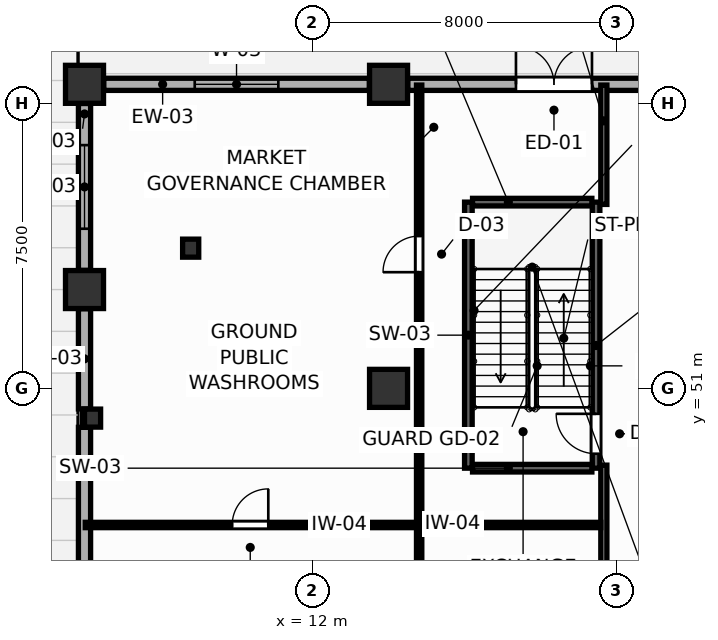
"""IFC4 building model, lengths in metres.
Left out: names, types, materials, properties, quantities, classifications, styles, units other than length and angle.
Written with IfcOpenShell. Run it as: python <this file> out.ifc"""

import sys

from ifc_helpers import new_model, si_unit, direction, frame, frame_2d, origin, origin_2d, place, context, subcontext, project, spatial, rectangle, i_section, extrude, source, transform, mapped, element, fill, save


model = new_model("IFC4")
c1 = context("Model", 3, precision=1e-05, world=origin(), true_north=direction((0.0, 1.0)))
c2 = subcontext(c1, "Body", "Model", "MODEL_VIEW")
j1 = project(units=[si_unit("LENGTHUNIT", "METRE"), si_unit("PLANEANGLEUNIT", "RADIAN")], contexts=[c1])
p1 = place(None, origin())
s1 = spatial("IfcSite", under=j1, at=p1, CompositionType="ELEMENT")
p2 = place(p1, origin())
s2 = spatial("IfcBuilding", under=s1, at=p2, CompositionType="ELEMENT")
p3 = place(p2, origin())
s3 = spatial("IfcBuildingStorey", under=s2, at=p3, CompositionType="ELEMENT", Elevation=0.0)
m1 = source(origin(), c2, "Body", "SweptSolid", [
    extrude(rectangle(XDim=1.0, YDim=1.0, at=origin_2d()), origin(), (0.0, 0.0, 1.0), 4.8),
])
for number, where, z_axis, x_axis in (
    (1, (6.0, 53.6, 0.0), (0.0, 0.0, 1.0), (1.0, 0.0, 0.0)),
    (2, (6.0, 59.0, 0.0), (0.0, 0.0, 1.0), (1.0, 0.0, 0.0)),
    (3, (14.0, 59.0, 0.0), (0.0, 0.0, 1.0), (1.0, 0.0, 0.0)),
    (4, (14.0, 51.0, 0.0), (0.0, 0.0, 1.0), (1.0, 0.0, 0.0)),
):
    element("IfcColumn", number, at=place(p3, frame(where, z_axis=z_axis, x_axis=x_axis)), inside=s3, PredefinedType="COLUMN", context=c2, shape_type="MappedRepresentation", body=[
        mapped(m1, transform((0.0, 0.0, 0.0), scale=1.0)),
    ])
m2 = source(origin(), c2, "Body", "SweptSolid", [
    extrude(i_section(OverallWidth=0.424, OverallDepth=0.474, WebThickness=0.045, FlangeThickness=0.072, FilletRadius=0.015, at=origin_2d()), origin(), (0.0, 0.0, 1.0), 4.8),
])
for number, where, z_axis, x_axis in (
    (5, (8.793, 54.689, 0.0), (0.0, 0.0, 1.0), (1.0, 0.0, 0.0)),
    (6, (6.211, 50.217, 0.0), (0.0, 0.0, 1.0), (1.0, 0.0, 0.0)),
):
    element("IfcColumn", number, at=place(p3, frame(where, z_axis=z_axis, x_axis=x_axis)), inside=s3, PredefinedType="COLUMN", context=c2, shape_type="MappedRepresentation", body=[
        mapped(m2, transform((0.0, 0.0, 0.0), scale=1.0)),
    ])
p4 = place(p3, frame((6.505, 59.0, 0.0), z_axis=(0.0, 0.0, 1.0), x_axis=(1.0, 0.0, 0.0)))
e7 = element("IfcWall", 7, at=p4, inside=s3, PredefinedType="SOLIDWALL", context=c2, shape_type="SweptSolid", body=[
    extrude(rectangle(XDim=6.99, YDim=0.32, at=frame_2d((3.495, 0.0))), origin(), (0.0, 0.0, 1.0), 3.82),
])
p5 = place(p4, frame((2.395, 0.0, 0.75)))
e8 = element("IfcOpeningElement", 8, at=p5, cuts=e7, PredefinedType="OPENING", context=c2, shape_type="SweptSolid", body=[
    extrude(rectangle(XDim=2.2, YDim=2.0, at=frame_2d((1.1, 1.0))), frame((0.0, 0.17, 0.0), z_axis=(0.0, -1.0, 0.0), x_axis=(1.0, 0.0, 0.0)), (0.0, 0.0, 1.0), 0.34),
])
p6 = place(p3, frame((14.505, 59.0, 0.0), z_axis=(0.0, 0.0, 1.0), x_axis=(1.0, 0.0, 0.0)))
e9 = element("IfcWall", 9, at=p6, inside=s3, PredefinedType="SOLIDWALL", context=c2, shape_type="SweptSolid", body=[
    extrude(rectangle(XDim=12.59, YDim=0.32, at=frame_2d((6.295, 0.0))), origin(), (0.0, 0.0, 1.0), 3.82),
])
p7 = place(p6, frame((2.847, 0.0, 0.0)))
e10 = element("IfcOpeningElement", 10, at=p7, cuts=e9, PredefinedType="OPENING", context=c2, shape_type="SweptSolid", body=[
    extrude(rectangle(XDim=2.0, YDim=2.25, at=frame_2d((1.0, 1.125))), frame((0.0, 0.17, 0.0), z_axis=(0.0, -1.0, 0.0), x_axis=(1.0, 0.0, 0.0)), (0.0, 0.0, 1.0), 0.34),
])
p8 = place(p3, frame((6.0, 40.505, 0.0), z_axis=(0.0, 0.0, 1.0), x_axis=(0.0, 1.0, 0.0)))
e11 = element("IfcWall", 11, at=p8, inside=s3, PredefinedType="SOLIDWALL", context=c2, shape_type="SweptSolid", body=[
    extrude(rectangle(XDim=9.47, YDim=0.32, at=frame_2d((4.735, 0.0))), origin(), (0.0, 0.0, 1.0), 3.82),
])
p9 = place(p8, frame((3.635, 0.0, 0.75)))
e12 = element("IfcOpeningElement", 12, at=p9, cuts=e11, PredefinedType="OPENING", context=c2, shape_type="SweptSolid", body=[
    extrude(rectangle(XDim=2.2, YDim=2.0, at=frame_2d((1.1, 1.0))), frame((0.0, 0.17, 0.0), z_axis=(0.0, -1.0, 0.0), x_axis=(1.0, 0.0, 0.0)), (0.0, 0.0, 1.0), 0.34),
])
p10 = place(p3, frame((6.0, 50.459, 0.0), z_axis=(0.0, 0.0, 1.0), x_axis=(0.0, 1.0, 0.0)))
e13 = element("IfcWall", 13, at=p10, inside=s3, PredefinedType="SOLIDWALL", context=c2, shape_type="SweptSolid", body=[
    extrude(rectangle(XDim=2.636, YDim=0.32, at=frame_2d((1.318, 0.0))), origin(), (0.0, 0.0, 1.0), 3.82),
])
p11 = place(p3, frame((6.0, 54.105, 0.0), z_axis=(0.0, 0.0, 1.0), x_axis=(0.0, 1.0, 0.0)))
e14 = element("IfcWall", 14, at=p11, inside=s3, PredefinedType="SOLIDWALL", context=c2, shape_type="SweptSolid", body=[
    extrude(rectangle(XDim=4.39, YDim=0.32, at=frame_2d((2.195, 0.0))), origin(), (0.0, 0.0, 1.0), 3.82),
])
p12 = place(p11, frame((1.095, 0.0, 0.75)))
e15 = element("IfcOpeningElement", 15, at=p12, cuts=e14, PredefinedType="OPENING", context=c2, shape_type="SweptSolid", body=[
    extrude(rectangle(XDim=2.2, YDim=2.0, at=frame_2d((1.1, 1.0))), frame((0.0, 0.17, 0.0), z_axis=(0.0, -1.0, 0.0), x_axis=(1.0, 0.0, 0.0)), (0.0, 0.0, 1.0), 0.34),
])
p13 = place(p3, frame((19.46, 48.9, 0.0), z_axis=(0.0, 0.0, 1.0), x_axis=(0.0, 1.0, 0.0)))
e16 = element("IfcWall", 16, at=p13, inside=s3, PredefinedType="SHEAR", context=c2, shape_type="SweptSolid", body=[
    extrude(rectangle(XDim=7.0, YDim=0.2, at=frame_2d((3.5, 0.0))), origin(), (0.0, 0.0, 1.0), 4.8),
])
p14 = place(p13, frame((0.38, 0.0, 0.0)))
e17 = element("IfcOpeningElement", 17, at=p14, cuts=e16, PredefinedType="OPENING", context=c2, shape_type="SweptSolid", body=[
    extrude(rectangle(XDim=1.05, YDim=2.1, at=frame_2d((0.525, 1.05))), frame((0.0, 0.11, 0.0), z_axis=(0.0, -1.0, 0.0), x_axis=(1.0, 0.0, 0.0)), (0.0, 0.0, 1.0), 0.22),
])
p15 = place(p3, frame((16.1, 48.9, 0.0), z_axis=(0.0, 0.0, 1.0), x_axis=(0.0, 1.0, 0.0)))
e18 = element("IfcWall", 18, at=p15, inside=s3, PredefinedType="SHEAR", context=c2, shape_type="SweptSolid", body=[
    extrude(rectangle(XDim=7.0, YDim=0.2, at=frame_2d((3.5, 0.0))), origin(), (0.0, 0.0, 1.0), 4.8),
])
for number, where, z_axis, x_axis in (
    (19, (16.21, 55.9, 0.0), (0.0, 0.0, 1.0), (1.0, 0.0, 0.0)),
    (20, (16.21, 48.9, 0.0), (0.0, 0.0, 1.0), (1.0, 0.0, 0.0)),
):
    element("IfcWall", number, at=place(p3, frame(where, z_axis=z_axis, x_axis=x_axis)), inside=s3, PredefinedType="SHEAR", context=c2, shape_type="SweptSolid", body=[
        extrude(rectangle(XDim=3.14, YDim=0.2, at=frame_2d((1.57, 0.0))), origin(), (0.0, 0.0, 1.0), 4.8),
    ])
p16 = place(p3, frame((19.665, 32.27, 0.0), z_axis=(0.0, 0.0, 1.0), x_axis=(0.0, 1.0, 0.0)))
e21 = element("IfcWall", 21, at=p16, inside=s3, PredefinedType="PARTITIONING", context=c2, shape_type="SweptSolid", body=[
    extrude(rectangle(XDim=16.71, YDim=0.16, at=frame_2d((8.355, 0.0))), origin(), (0.0, 0.0, 1.0), 4.52),
])
p17 = place(p16, frame((3.946, 0.0, 0.0)))
e22 = element("IfcOpeningElement", 22, at=p17, cuts=e21, PredefinedType="OPENING", context=c2, shape_type="SweptSolid", body=[
    extrude(rectangle(XDim=0.95, YDim=2.05, at=frame_2d((0.475, 1.025))), frame((0.0, 0.09, 0.0), z_axis=(0.0, -1.0, 0.0), x_axis=(1.0, 0.0, 0.0)), (0.0, 0.0, 1.0), 0.18),
])
p18 = place(p3, frame((19.665, 55.84, 0.0), z_axis=(0.0, 0.0, 1.0), x_axis=(0.0, 1.0, 0.0)))
e23 = element("IfcWall", 23, at=p18, inside=s3, PredefinedType="PARTITIONING", context=c2, shape_type="SweptSolid", body=[
    extrude(rectangle(XDim=3.14, YDim=0.16, at=frame_2d((1.57, 0.0))), origin(), (0.0, 0.0, 1.0), 4.52),
])
p19 = place(p3, frame((14.805, 32.357, 0.0), z_axis=(0.0, 0.0, 1.0), x_axis=(0.0, 1.0, 0.0)))
e24 = element("IfcWall", 24, at=p19, inside=s3, PredefinedType="PARTITIONING", context=c2, shape_type="SweptSolid", body=[
    extrude(rectangle(XDim=26.623, YDim=0.14, at=frame_2d((13.312, 0.0))), origin(), (0.0, 0.0, 1.0), 4.52),
])
p20 = place(p19, frame((21.7, 0.0, 0.0)))
e25 = element("IfcOpeningElement", 25, at=p20, cuts=e24, PredefinedType="OPENING", context=c2, shape_type="SweptSolid", body=[
    extrude(rectangle(XDim=0.95, YDim=2.05, at=frame_2d((0.475, 1.025))), frame((0.0, 0.08, 0.0), z_axis=(0.0, -1.0, 0.0), x_axis=(1.0, 0.0, 0.0)), (0.0, 0.0, 1.0), 0.16),
])
p21 = place(p3, frame((6.02, 47.405, 0.0), z_axis=(0.0, 0.0, 1.0), x_axis=(1.0, 0.0, 0.0)))
e26 = element("IfcWall", 26, at=p21, inside=s3, PredefinedType="PARTITIONING", context=c2, shape_type="SweptSolid", body=[
    extrude(rectangle(XDim=13.563, YDim=0.14, at=frame_2d((6.781, 0.0))), origin(), (0.0, 0.0, 1.0), 4.52),
])
p22 = place(p21, frame((3.866, 0.0, 0.0)))
e27 = element("IfcOpeningElement", 27, at=p22, cuts=e26, PredefinedType="OPENING", context=c2, shape_type="SweptSolid", body=[
    extrude(rectangle(XDim=0.95, YDim=2.05, at=frame_2d((0.475, 1.025))), frame((0.0, 0.08, 0.0), z_axis=(0.0, -1.0, 0.0), x_axis=(1.0, 0.0, 0.0)), (0.0, 0.0, 1.0), 0.16),
])
p23 = place(p5, origin())
e28 = element("IfcWindow", 28, at=p23, inside=s3, PartitioningType="SINGLE_PANEL", PredefinedType="WINDOW", context=c2, shape_type="SweptSolid", body=[
    extrude(rectangle(XDim=2.2, YDim=2.0, at=frame_2d((1.1, 1.0))), frame((0.0, 0.03, 0.0), z_axis=(0.0, -1.0, 0.0), x_axis=(1.0, 0.0, 0.0)), (0.0, 0.0, 1.0), 0.06),
])
fill(e8, e28)
p24 = place(p7, origin())
e29 = element("IfcDoor", 29, at=p24, inside=s3, OperationType="DOUBLE_DOOR_SINGLE_SWING", PredefinedType="DOOR", context=c2, shape_type="SweptSolid", body=[
    extrude(rectangle(XDim=2.0, YDim=2.25, at=frame_2d((1.0, 1.125))), frame((0.0, 0.025, 0.0), z_axis=(0.0, -1.0, 0.0), x_axis=(1.0, 0.0, 0.0)), (0.0, 0.0, 1.0), 0.05),
])
fill(e10, e29)
p25 = place(p12, origin())
e30 = element("IfcWindow", 30, at=p25, inside=s3, PartitioningType="SINGLE_PANEL", PredefinedType="WINDOW", context=c2, shape_type="SweptSolid", body=[
    extrude(rectangle(XDim=2.2, YDim=2.0, at=frame_2d((1.1, 1.0))), frame((0.0, 0.03, 0.0), z_axis=(0.0, -1.0, 0.0), x_axis=(1.0, 0.0, 0.0)), (0.0, 0.0, 1.0), 0.06),
])
fill(e15, e30)
p26 = place(p14, origin())
e31 = element("IfcDoor", 31, at=p26, inside=s3, OperationType="SINGLE_SWING_RIGHT", PredefinedType="DOOR", context=c2, shape_type="SweptSolid", body=[
    extrude(rectangle(XDim=1.05, YDim=2.1, at=frame_2d((0.525, 1.05))), frame((0.0, 0.025, 0.0), z_axis=(0.0, -1.0, 0.0), x_axis=(1.0, 0.0, 0.0)), (0.0, 0.0, 1.0), 0.05),
])
fill(e17, e31)
p27 = place(p20, origin())
e32 = element("IfcDoor", 32, at=p27, inside=s3, OperationType="SINGLE_SWING_LEFT", PredefinedType="DOOR", context=c2, shape_type="SweptSolid", body=[
    extrude(rectangle(XDim=0.95, YDim=2.05, at=frame_2d((0.475, 1.025))), frame((0.0, 0.025, 0.0), z_axis=(0.0, -1.0, 0.0), x_axis=(1.0, 0.0, 0.0)), (0.0, 0.0, 1.0), 0.05),
])
fill(e25, e32)
p28 = place(p22, origin())
e33 = element("IfcDoor", 33, at=p28, inside=s3, OperationType="SINGLE_SWING_RIGHT", PredefinedType="DOOR", context=c2, shape_type="SweptSolid", body=[
    extrude(rectangle(XDim=0.95, YDim=2.05, at=frame_2d((0.475, 1.025))), frame((0.0, 0.025, 0.0), z_axis=(0.0, -1.0, 0.0), x_axis=(1.0, 0.0, 0.0)), (0.0, 0.0, 1.0), 0.05),
])
fill(e27, e33)
save(model, sys.argv[1])
